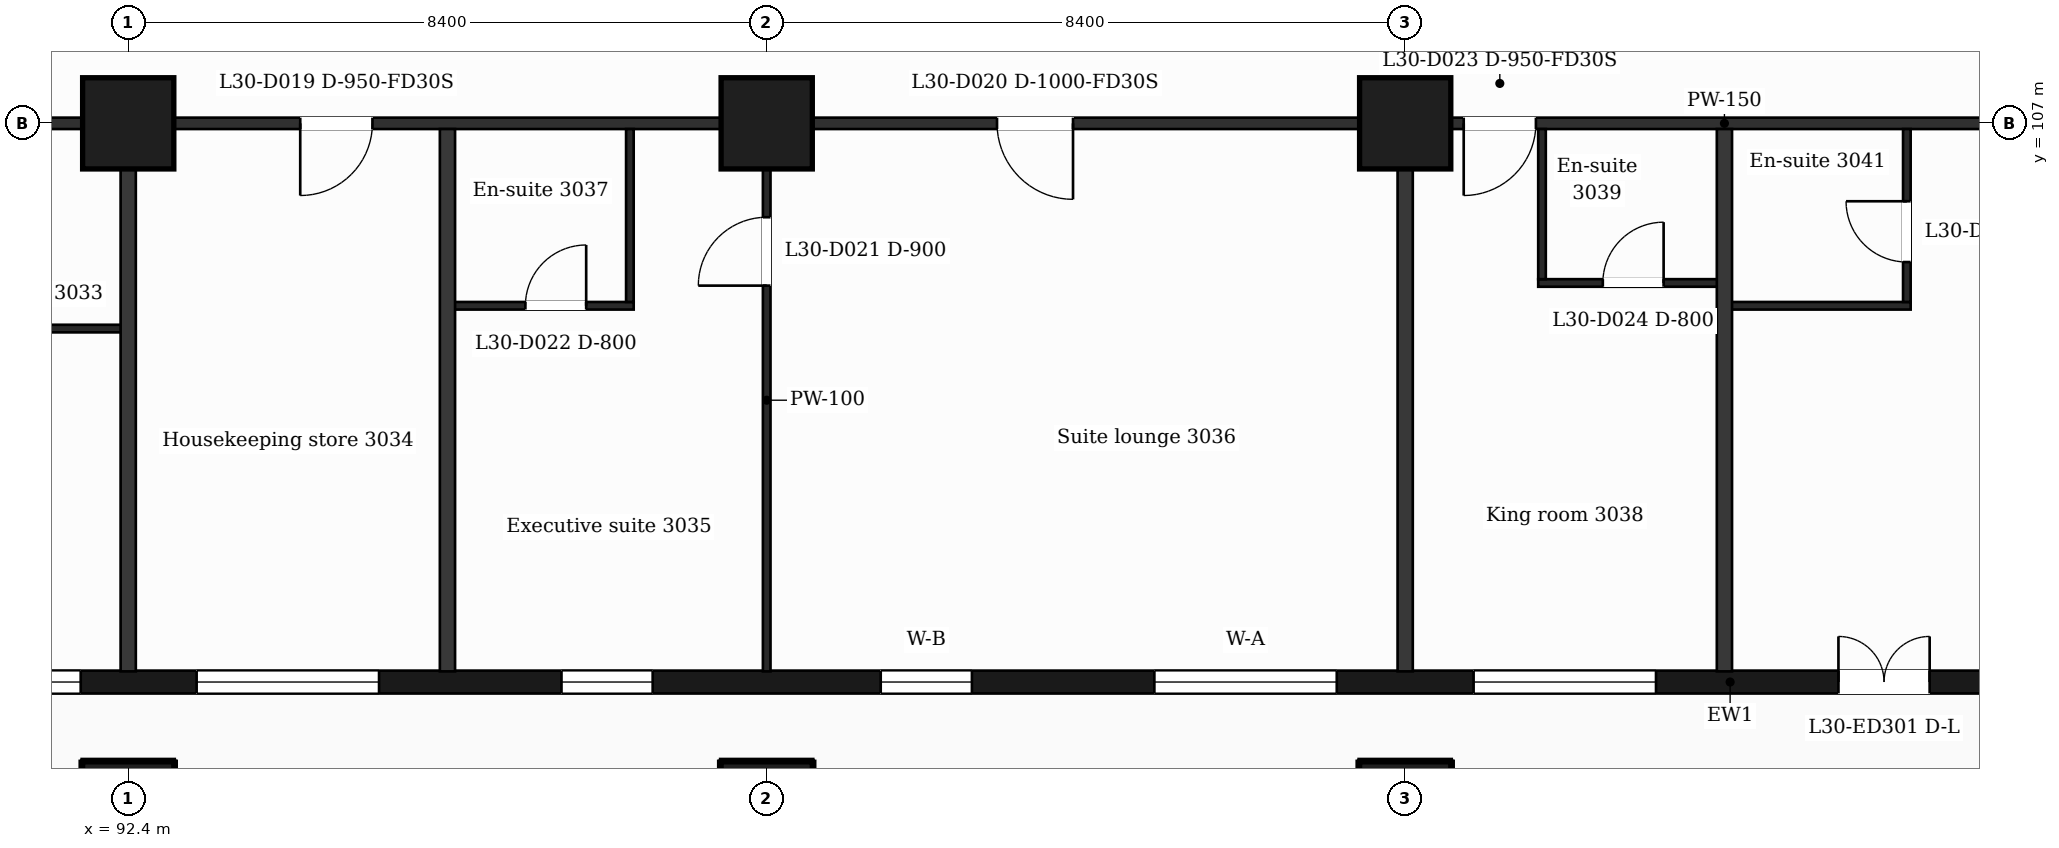
"""IFC4 building model, lengths in metres.
Left out: names, types, materials, properties, quantities, classifications, styles, units other than length and angle.
Written with IfcOpenShell. Run it as: python <this file> out.ifc"""

import sys

from ifc_helpers import new_model, si_unit, direction, frame, frame_2d, origin, origin_2d, place, context, subcontext, project, spatial, rectangle, extrude, element, fill, save


model = new_model("IFC4")
c1 = context("Model", 3, precision=1e-05, world=origin(), true_north=direction((0.0, 1.0)))
c2 = subcontext(c1, "Body", "Model", "MODEL_VIEW")
j1 = project(units=[si_unit("LENGTHUNIT", "METRE"), si_unit("PLANEANGLEUNIT", "RADIAN")], contexts=[c1])
p1 = place(None, origin())
s1 = spatial("IfcSite", under=j1, at=p1, CompositionType="ELEMENT")
p2 = place(p1, origin())
s2 = spatial("IfcBuilding", under=s1, at=p2, CompositionType="ELEMENT")
p3 = place(p2, frame((0.0, 0.0, 128.0)))
s3 = spatial("IfcBuildingStorey", under=s2, at=p3, CompositionType="ELEMENT", Elevation=128.0)
for number, where, z_axis, x_axis in (
    (1, (92.4, 98.0, 0.0), (0.0, 0.0, 1.0), (1.0, 0.0, 0.0)),
    (2, (100.8, 98.0, 0.0), (0.0, 0.0, 1.0), (1.0, 0.0, 0.0)),
    (3, (109.2, 98.0, 0.0), (0.0, 0.0, 1.0), (1.0, 0.0, 0.0)),
    (4, (92.4, 107.0, 0.0), (0.0, 0.0, 1.0), (1.0, 0.0, 0.0)),
    (5, (100.8, 107.0, 0.0), (0.0, 0.0, 1.0), (1.0, 0.0, 0.0)),
    (6, (109.2, 107.0, 0.0), (0.0, 0.0, 1.0), (1.0, 0.0, 0.0)),
):
    element("IfcColumn", number, at=place(p3, frame(where, z_axis=z_axis, x_axis=x_axis)), inside=s3, PredefinedType="COLUMN", context=c2, shape_type="SweptSolid", body=[
        extrude(rectangle(XDim=1.2, YDim=1.2, at=origin_2d()), origin(), (0.0, 0.0, 1.0), 3.7),
    ])
p4 = place(p3, frame((89.85, 99.65, 0.0), z_axis=(0.0, 0.0, 1.0), x_axis=(1.0, 0.0, 0.0)))
e7 = element("IfcWall", 7, at=p4, inside=s3, PredefinedType="SOLIDWALL", context=c2, shape_type="SweptSolid", body=[
    extrude(rectangle(XDim=47.25, YDim=0.3, at=frame_2d((23.625, 0.0))), origin(), (0.0, 0.0, 1.0), 3.38),
])
p5 = place(p4, frame((0.725, 0.0, 0.9)))
e8 = element("IfcOpeningElement", 8, at=p5, cuts=e7, PredefinedType="OPENING", context=c2, shape_type="SweptSolid", body=[
    extrude(rectangle(XDim=1.2, YDim=2.1, at=frame_2d((0.6, 1.05))), frame((0.0, 0.16, 0.0), z_axis=(0.0, -1.0, 0.0), x_axis=(1.0, 0.0, 0.0)), (0.0, 0.0, 1.0), 0.32),
])
p6 = place(p4, frame((3.45, 0.0, 0.9)))
e9 = element("IfcOpeningElement", 9, at=p6, cuts=e7, PredefinedType="OPENING", context=c2, shape_type="SweptSolid", body=[
    extrude(rectangle(XDim=2.4, YDim=2.1, at=frame_2d((1.2, 1.05))), frame((0.0, 0.16, 0.0), z_axis=(0.0, -1.0, 0.0), x_axis=(1.0, 0.0, 0.0)), (0.0, 0.0, 1.0), 0.32),
])
p7 = place(p4, frame((8.25, 0.0, 0.9)))
e10 = element("IfcOpeningElement", 10, at=p7, cuts=e7, PredefinedType="OPENING", context=c2, shape_type="SweptSolid", body=[
    extrude(rectangle(XDim=1.2, YDim=2.1, at=frame_2d((0.6, 1.05))), frame((0.0, 0.16, 0.0), z_axis=(0.0, -1.0, 0.0), x_axis=(1.0, 0.0, 0.0)), (0.0, 0.0, 1.0), 0.32),
])
p8 = place(p4, frame((12.45, 0.0, 0.9)))
e11 = element("IfcOpeningElement", 11, at=p8, cuts=e7, PredefinedType="OPENING", context=c2, shape_type="SweptSolid", body=[
    extrude(rectangle(XDim=1.2, YDim=2.1, at=frame_2d((0.6, 1.05))), frame((0.0, 0.16, 0.0), z_axis=(0.0, -1.0, 0.0), x_axis=(1.0, 0.0, 0.0)), (0.0, 0.0, 1.0), 0.32),
])
p9 = place(p4, frame((16.05, 0.0, 0.9)))
e12 = element("IfcOpeningElement", 12, at=p9, cuts=e7, PredefinedType="OPENING", context=c2, shape_type="SweptSolid", body=[
    extrude(rectangle(XDim=2.4, YDim=2.1, at=frame_2d((1.2, 1.05))), frame((0.0, 0.16, 0.0), z_axis=(0.0, -1.0, 0.0), x_axis=(1.0, 0.0, 0.0)), (0.0, 0.0, 1.0), 0.32),
])
p10 = place(p4, frame((20.25, 0.0, 0.9)))
e13 = element("IfcOpeningElement", 13, at=p10, cuts=e7, PredefinedType="OPENING", context=c2, shape_type="SweptSolid", body=[
    extrude(rectangle(XDim=2.4, YDim=2.1, at=frame_2d((1.2, 1.05))), frame((0.0, 0.16, 0.0), z_axis=(0.0, -1.0, 0.0), x_axis=(1.0, 0.0, 0.0)), (0.0, 0.0, 1.0), 0.32),
])
p11 = place(p4, frame((25.05, 0.0, 0.0)))
e14 = element("IfcOpeningElement", 14, at=p11, cuts=e7, PredefinedType="OPENING", context=c2, shape_type="SweptSolid", body=[
    extrude(rectangle(XDim=1.2, YDim=2.4, at=frame_2d((0.6, 1.2))), frame((0.0, 0.16, 0.0), z_axis=(0.0, -1.0, 0.0), x_axis=(1.0, 0.0, 0.0)), (0.0, 0.0, 1.0), 0.32),
])
p12 = place(p4, frame((28.65, 0.0, 0.9)))
e15 = element("IfcOpeningElement", 15, at=p12, cuts=e7, PredefinedType="OPENING", context=c2, shape_type="SweptSolid", body=[
    extrude(rectangle(XDim=2.4, YDim=2.1, at=frame_2d((1.2, 1.05))), frame((0.0, 0.16, 0.0), z_axis=(0.0, -1.0, 0.0), x_axis=(1.0, 0.0, 0.0)), (0.0, 0.0, 1.0), 0.32),
])
p13 = place(p4, frame((32.85, 0.0, 0.9)))
e16 = element("IfcOpeningElement", 16, at=p13, cuts=e7, PredefinedType="OPENING", context=c2, shape_type="SweptSolid", body=[
    extrude(rectangle(XDim=2.4, YDim=2.1, at=frame_2d((1.2, 1.05))), frame((0.0, 0.16, 0.0), z_axis=(0.0, -1.0, 0.0), x_axis=(1.0, 0.0, 0.0)), (0.0, 0.0, 1.0), 0.32),
])
p14 = place(p4, frame((37.65, 0.0, 0.9)))
e17 = element("IfcOpeningElement", 17, at=p14, cuts=e7, PredefinedType="OPENING", context=c2, shape_type="SweptSolid", body=[
    extrude(rectangle(XDim=1.2, YDim=2.1, at=frame_2d((0.6, 1.05))), frame((0.0, 0.16, 0.0), z_axis=(0.0, -1.0, 0.0), x_axis=(1.0, 0.0, 0.0)), (0.0, 0.0, 1.0), 0.32),
])
p15 = place(p4, frame((41.85, 0.0, 0.9)))
e18 = element("IfcOpeningElement", 18, at=p15, cuts=e7, PredefinedType="OPENING", context=c2, shape_type="SweptSolid", body=[
    extrude(rectangle(XDim=1.2, YDim=2.1, at=frame_2d((0.6, 1.05))), frame((0.0, 0.16, 0.0), z_axis=(0.0, -1.0, 0.0), x_axis=(1.0, 0.0, 0.0)), (0.0, 0.0, 1.0), 0.32),
])
p16 = place(p4, frame((45.25, 0.0, 0.9)))
e19 = element("IfcOpeningElement", 19, at=p16, cuts=e7, PredefinedType="OPENING", context=c2, shape_type="SweptSolid", body=[
    extrude(rectangle(XDim=1.2, YDim=2.1, at=frame_2d((0.6, 1.05))), frame((0.0, 0.16, 0.0), z_axis=(0.0, -1.0, 0.0), x_axis=(1.0, 0.0, 0.0)), (0.0, 0.0, 1.0), 0.32),
])
p17 = place(p3, frame((89.95, 104.3, 0.0), z_axis=(0.0, 0.0, 1.0), x_axis=(1.0, 0.0, 0.0)))
e20 = element("IfcWall", 20, at=p17, inside=s3, PredefinedType="PARTITIONING", context=c2, shape_type="SweptSolid", body=[
    extrude(rectangle(XDim=2.45, YDim=0.1, at=frame_2d((1.225, 0.0))), origin(), (0.0, 0.0, 1.0), 3.38),
])
p18 = place(p3, frame((96.6, 104.6, 0.0), z_axis=(0.0, 0.0, 1.0), x_axis=(1.0, 0.0, 0.0)))
e21 = element("IfcWall", 21, at=p18, inside=s3, PredefinedType="PARTITIONING", context=c2, shape_type="SweptSolid", body=[
    extrude(rectangle(XDim=2.45, YDim=0.1, at=frame_2d((1.225, 0.0))), origin(), (0.0, 0.0, 1.0), 3.38),
])
p19 = place(p18, frame((1.025, 0.0, 0.0)))
e22 = element("IfcOpeningElement", 22, at=p19, cuts=e21, PredefinedType="OPENING", context=c2, shape_type="SweptSolid", body=[
    extrude(rectangle(XDim=0.8, YDim=2.1, at=frame_2d((0.4, 1.05))), frame((0.0, 0.06, 0.0), z_axis=(0.0, -1.0, 0.0), x_axis=(1.0, 0.0, 0.0)), (0.0, 0.0, 1.0), 0.12),
])
p20 = place(p3, frame((113.4, 104.6, 0.0), z_axis=(0.0, 0.0, 1.0), x_axis=(1.0, 0.0, 0.0)))
e23 = element("IfcWall", 23, at=p20, inside=s3, PredefinedType="PARTITIONING", context=c2, shape_type="SweptSolid", body=[
    extrude(rectangle(XDim=2.45, YDim=0.1, at=frame_2d((1.225, 0.0))), origin(), (0.0, 0.0, 1.0), 3.38),
])
p21 = place(p3, frame((110.95, 104.9, 0.0), z_axis=(0.0, 0.0, 1.0), x_axis=(1.0, 0.0, 0.0)))
e24 = element("IfcWall", 24, at=p21, inside=s3, PredefinedType="PARTITIONING", context=c2, shape_type="SweptSolid", body=[
    extrude(rectangle(XDim=2.45, YDim=0.1, at=frame_2d((1.225, 0.0))), origin(), (0.0, 0.0, 1.0), 3.38),
])
p22 = place(p21, frame((0.85, 0.0, 0.0)))
e25 = element("IfcOpeningElement", 25, at=p22, cuts=e24, PredefinedType="OPENING", context=c2, shape_type="SweptSolid", body=[
    extrude(rectangle(XDim=0.8, YDim=2.1, at=frame_2d((0.4, 1.05))), frame((0.0, 0.06, 0.0), z_axis=(0.0, -1.0, 0.0), x_axis=(1.0, 0.0, 0.0)), (0.0, 0.0, 1.0), 0.12),
])
p23 = place(p3, frame((87.018, 107.0, 0.0), z_axis=(0.0, 0.0, 1.0), x_axis=(1.0, 0.0, 0.0)))
e26 = element("IfcWall", 26, at=p23, inside=s3, PredefinedType="PARTITIONING", context=c2, shape_type="SweptSolid", body=[
    extrude(rectangle(XDim=52.765, YDim=0.15, at=frame_2d((26.382, 0.0))), origin(), (0.0, 0.0, 1.0), 3.38),
])
p24 = place(p23, frame((1.276, 0.0, 0.0)))
e27 = element("IfcOpeningElement", 27, at=p24, cuts=e26, PredefinedType="OPENING", context=c2, shape_type="SweptSolid", body=[
    extrude(rectangle(XDim=0.95, YDim=2.1, at=frame_2d((0.475, 1.05))), frame((0.0, 0.085, 0.0), z_axis=(0.0, -1.0, 0.0), x_axis=(1.0, 0.0, 0.0)), (0.0, 0.0, 1.0), 0.17),
])
p25 = place(p23, frame((7.645, 0.0, 0.0)))
e28 = element("IfcOpeningElement", 28, at=p25, cuts=e26, PredefinedType="OPENING", context=c2, shape_type="SweptSolid", body=[
    extrude(rectangle(XDim=0.95, YDim=2.1, at=frame_2d((0.475, 1.05))), frame((0.0, 0.085, 0.0), z_axis=(0.0, -1.0, 0.0), x_axis=(1.0, 0.0, 0.0)), (0.0, 0.0, 1.0), 0.17),
])
p26 = place(p23, frame((16.812, 0.0, 0.0)))
e29 = element("IfcOpeningElement", 29, at=p26, cuts=e26, PredefinedType="OPENING", context=c2, shape_type="SweptSolid", body=[
    extrude(rectangle(XDim=1.0, YDim=2.1, at=frame_2d((0.5, 1.05))), frame((0.0, 0.085, 0.0), z_axis=(0.0, -1.0, 0.0), x_axis=(1.0, 0.0, 0.0)), (0.0, 0.0, 1.0), 0.17),
])
p27 = place(p23, frame((22.952, 0.0, 0.0)))
e30 = element("IfcOpeningElement", 30, at=p27, cuts=e26, PredefinedType="OPENING", context=c2, shape_type="SweptSolid", body=[
    extrude(rectangle(XDim=0.95, YDim=2.1, at=frame_2d((0.475, 1.05))), frame((0.0, 0.085, 0.0), z_axis=(0.0, -1.0, 0.0), x_axis=(1.0, 0.0, 0.0)), (0.0, 0.0, 1.0), 0.17),
])
p28 = place(p23, frame((31.742, 0.0, 0.0)))
e31 = element("IfcOpeningElement", 31, at=p28, cuts=e26, PredefinedType="OPENING", context=c2, shape_type="SweptSolid", body=[
    extrude(rectangle(XDim=0.95, YDim=2.1, at=frame_2d((0.475, 1.05))), frame((0.0, 0.085, 0.0), z_axis=(0.0, -1.0, 0.0), x_axis=(1.0, 0.0, 0.0)), (0.0, 0.0, 1.0), 0.17),
])
p29 = place(p23, frame((35.169, 0.0, 0.0)))
e32 = element("IfcOpeningElement", 32, at=p29, cuts=e26, PredefinedType="OPENING", context=c2, shape_type="SweptSolid", body=[
    extrude(rectangle(XDim=0.95, YDim=2.1, at=frame_2d((0.475, 1.05))), frame((0.0, 0.085, 0.0), z_axis=(0.0, -1.0, 0.0), x_axis=(1.0, 0.0, 0.0)), (0.0, 0.0, 1.0), 0.17),
])
p30 = place(p23, frame((41.807, 0.0, 0.0)))
e33 = element("IfcOpeningElement", 33, at=p30, cuts=e26, PredefinedType="OPENING", context=c2, shape_type="SweptSolid", body=[
    extrude(rectangle(XDim=0.95, YDim=2.1, at=frame_2d((0.475, 1.05))), frame((0.0, 0.085, 0.0), z_axis=(0.0, -1.0, 0.0), x_axis=(1.0, 0.0, 0.0)), (0.0, 0.0, 1.0), 0.17),
])
p31 = place(p23, frame((43.832, 0.0, 0.0)))
e34 = element("IfcOpeningElement", 34, at=p31, cuts=e26, PredefinedType="OPENING", context=c2, shape_type="SweptSolid", body=[
    extrude(rectangle(XDim=0.95, YDim=2.1, at=frame_2d((0.475, 1.05))), frame((0.0, 0.085, 0.0), z_axis=(0.0, -1.0, 0.0), x_axis=(1.0, 0.0, 0.0)), (0.0, 0.0, 1.0), 0.17),
])
p32 = place(p23, frame((48.974, 0.0, 0.0)))
e35 = element("IfcOpeningElement", 35, at=p32, cuts=e26, PredefinedType="OPENING", context=c2, shape_type="SweptSolid", body=[
    extrude(rectangle(XDim=0.95, YDim=2.1, at=frame_2d((0.475, 1.05))), frame((0.0, 0.085, 0.0), z_axis=(0.0, -1.0, 0.0), x_axis=(1.0, 0.0, 0.0)), (0.0, 0.0, 1.0), 0.17),
])
for number, where, z_axis, x_axis in (
    (36, (92.4, 99.79, 0.0), (0.0, 0.0, 1.0), (0.0, 1.0, 0.0)),
    (37, (96.6, 99.79, 0.0), (0.0, 0.0, 1.0), (0.0, 1.0, 0.0)),
):
    element("IfcWall", number, at=place(p3, frame(where, z_axis=z_axis, x_axis=x_axis)), inside=s3, PredefinedType="PARTITIONING", context=c2, shape_type="SweptSolid", body=[
        extrude(rectangle(XDim=7.135, YDim=0.2, at=frame_2d((3.567, 0.0))), origin(), (0.0, 0.0, 1.0), 3.38),
    ])
p33 = place(p3, frame((99.0, 104.65, 0.0), z_axis=(0.0, 0.0, 1.0), x_axis=(0.0, 1.0, 0.0)))
e38 = element("IfcWall", 38, at=p33, inside=s3, PredefinedType="PARTITIONING", context=c2, shape_type="SweptSolid", body=[
    extrude(rectangle(XDim=2.275, YDim=0.1, at=frame_2d((1.138, 0.0))), origin(), (0.0, 0.0, 1.0), 3.38),
])
p34 = place(p3, frame((100.8, 99.79, 0.0), z_axis=(0.0, 0.0, 1.0), x_axis=(0.0, 1.0, 0.0)))
e39 = element("IfcWall", 39, at=p34, inside=s3, PredefinedType="PARTITIONING", context=c2, shape_type="SweptSolid", body=[
    extrude(rectangle(XDim=7.135, YDim=0.1, at=frame_2d((3.567, 0.0))), origin(), (0.0, 0.0, 1.0), 3.38),
])
p35 = place(p34, frame((5.075, 0.0, 0.0)))
e40 = element("IfcOpeningElement", 40, at=p35, cuts=e39, PredefinedType="OPENING", context=c2, shape_type="SweptSolid", body=[
    extrude(rectangle(XDim=0.9, YDim=2.1, at=frame_2d((0.45, 1.05))), frame((0.0, 0.06, 0.0), z_axis=(0.0, -1.0, 0.0), x_axis=(1.0, 0.0, 0.0)), (0.0, 0.0, 1.0), 0.12),
])
p36 = place(p3, frame((109.2, 99.79, 0.0), z_axis=(0.0, 0.0, 1.0), x_axis=(0.0, 1.0, 0.0)))
e41 = element("IfcWall", 41, at=p36, inside=s3, PredefinedType="PARTITIONING", context=c2, shape_type="SweptSolid", body=[
    extrude(rectangle(XDim=7.135, YDim=0.2, at=frame_2d((3.567, 0.0))), origin(), (0.0, 0.0, 1.0), 3.38),
])
p37 = place(p3, frame((111.0, 104.95, 0.0), z_axis=(0.0, 0.0, 1.0), x_axis=(0.0, 1.0, 0.0)))
e42 = element("IfcWall", 42, at=p37, inside=s3, PredefinedType="PARTITIONING", context=c2, shape_type="SweptSolid", body=[
    extrude(rectangle(XDim=1.975, YDim=0.1, at=frame_2d((0.988, 0.0))), origin(), (0.0, 0.0, 1.0), 3.38),
])
p38 = place(p3, frame((113.4, 99.79, 0.0), z_axis=(0.0, 0.0, 1.0), x_axis=(0.0, 1.0, 0.0)))
e43 = element("IfcWall", 43, at=p38, inside=s3, PredefinedType="PARTITIONING", context=c2, shape_type="SweptSolid", body=[
    extrude(rectangle(XDim=7.135, YDim=0.2, at=frame_2d((3.567, 0.0))), origin(), (0.0, 0.0, 1.0), 3.38),
])
p39 = place(p3, frame((115.8, 104.65, 0.0), z_axis=(0.0, 0.0, 1.0), x_axis=(0.0, 1.0, 0.0)))
e44 = element("IfcWall", 44, at=p39, inside=s3, PredefinedType="PARTITIONING", context=c2, shape_type="SweptSolid", body=[
    extrude(rectangle(XDim=2.275, YDim=0.1, at=frame_2d((1.138, 0.0))), origin(), (0.0, 0.0, 1.0), 3.38),
])
p40 = place(p39, frame((0.525, 0.0, 0.0)))
e45 = element("IfcOpeningElement", 45, at=p40, cuts=e44, PredefinedType="OPENING", context=c2, shape_type="SweptSolid", body=[
    extrude(rectangle(XDim=0.8, YDim=2.1, at=frame_2d((0.4, 1.05))), frame((0.0, 0.06, 0.0), z_axis=(0.0, -1.0, 0.0), x_axis=(1.0, 0.0, 0.0)), (0.0, 0.0, 1.0), 0.12),
])
p41 = place(p5, origin())
e46 = element("IfcWindow", 46, at=p41, inside=s3, PartitioningType="SINGLE_PANEL", PredefinedType="WINDOW", context=c2, shape_type="SweptSolid", body=[
    extrude(rectangle(XDim=1.2, YDim=2.1, at=frame_2d((0.6, 1.05))), frame((0.0, 0.03, 0.0), z_axis=(0.0, -1.0, 0.0), x_axis=(1.0, 0.0, 0.0)), (0.0, 0.0, 1.0), 0.06),
])
fill(e8, e46)
p42 = place(p6, origin())
e47 = element("IfcWindow", 47, at=p42, inside=s3, PartitioningType="SINGLE_PANEL", PredefinedType="WINDOW", context=c2, shape_type="SweptSolid", body=[
    extrude(rectangle(XDim=2.4, YDim=2.1, at=frame_2d((1.2, 1.05))), frame((0.0, 0.03, 0.0), z_axis=(0.0, -1.0, 0.0), x_axis=(1.0, 0.0, 0.0)), (0.0, 0.0, 1.0), 0.06),
])
fill(e9, e47)
p43 = place(p7, origin())
e48 = element("IfcWindow", 48, at=p43, inside=s3, PartitioningType="SINGLE_PANEL", PredefinedType="WINDOW", context=c2, shape_type="SweptSolid", body=[
    extrude(rectangle(XDim=1.2, YDim=2.1, at=frame_2d((0.6, 1.05))), frame((0.0, 0.03, 0.0), z_axis=(0.0, -1.0, 0.0), x_axis=(1.0, 0.0, 0.0)), (0.0, 0.0, 1.0), 0.06),
])
fill(e10, e48)
p44 = place(p8, origin())
e49 = element("IfcWindow", 49, at=p44, inside=s3, PartitioningType="SINGLE_PANEL", PredefinedType="WINDOW", context=c2, shape_type="SweptSolid", body=[
    extrude(rectangle(XDim=1.2, YDim=2.1, at=frame_2d((0.6, 1.05))), frame((0.0, 0.03, 0.0), z_axis=(0.0, -1.0, 0.0), x_axis=(1.0, 0.0, 0.0)), (0.0, 0.0, 1.0), 0.06),
])
fill(e11, e49)
p45 = place(p9, origin())
e50 = element("IfcWindow", 50, at=p45, inside=s3, PartitioningType="SINGLE_PANEL", PredefinedType="WINDOW", context=c2, shape_type="SweptSolid", body=[
    extrude(rectangle(XDim=2.4, YDim=2.1, at=frame_2d((1.2, 1.05))), frame((0.0, 0.03, 0.0), z_axis=(0.0, -1.0, 0.0), x_axis=(1.0, 0.0, 0.0)), (0.0, 0.0, 1.0), 0.06),
])
fill(e12, e50)
p46 = place(p10, origin())
e51 = element("IfcWindow", 51, at=p46, inside=s3, PartitioningType="SINGLE_PANEL", PredefinedType="WINDOW", context=c2, shape_type="SweptSolid", body=[
    extrude(rectangle(XDim=2.4, YDim=2.1, at=frame_2d((1.2, 1.05))), frame((0.0, 0.03, 0.0), z_axis=(0.0, -1.0, 0.0), x_axis=(1.0, 0.0, 0.0)), (0.0, 0.0, 1.0), 0.06),
])
fill(e13, e51)
p47 = place(p11, origin())
e52 = element("IfcDoor", 52, at=p47, inside=s3, OperationType="DOUBLE_DOOR_SINGLE_SWING", PredefinedType="DOOR", context=c2, shape_type="SweptSolid", body=[
    extrude(rectangle(XDim=1.2, YDim=2.4, at=frame_2d((0.6, 1.2))), frame((0.0, 0.025, 0.0), z_axis=(0.0, -1.0, 0.0), x_axis=(1.0, 0.0, 0.0)), (0.0, 0.0, 1.0), 0.05),
])
fill(e14, e52)
p48 = place(p25, origin())
e53 = element("IfcDoor", 53, at=p48, inside=s3, OperationType="SINGLE_SWING_LEFT", PredefinedType="DOOR", context=c2, shape_type="SweptSolid", body=[
    extrude(rectangle(XDim=0.95, YDim=2.1, at=frame_2d((0.475, 1.05))), frame((0.0, 0.025, 0.0), z_axis=(0.0, -1.0, 0.0), x_axis=(1.0, 0.0, 0.0)), (0.0, 0.0, 1.0), 0.05),
])
fill(e28, e53)
p49 = place(p26, origin())
e54 = element("IfcDoor", 54, at=p49, inside=s3, OperationType="SINGLE_SWING_RIGHT", PredefinedType="DOOR", context=c2, shape_type="SweptSolid", body=[
    extrude(rectangle(XDim=1.0, YDim=2.1, at=frame_2d((0.5, 1.05))), frame((0.0, 0.025, 0.0), z_axis=(0.0, -1.0, 0.0), x_axis=(1.0, 0.0, 0.0)), (0.0, 0.0, 1.0), 0.05),
])
fill(e29, e54)
p50 = place(p35, origin())
e55 = element("IfcDoor", 55, at=p50, inside=s3, OperationType="SINGLE_SWING_LEFT", PredefinedType="DOOR", context=c2, shape_type="SweptSolid", body=[
    extrude(rectangle(XDim=0.9, YDim=2.1, at=frame_2d((0.45, 1.05))), frame((0.0, 0.025, 0.0), z_axis=(0.0, -1.0, 0.0), x_axis=(1.0, 0.0, 0.0)), (0.0, 0.0, 1.0), 0.05),
])
fill(e40, e55)
p51 = place(p19, origin())
e56 = element("IfcDoor", 56, at=p51, inside=s3, OperationType="SINGLE_SWING_RIGHT", PredefinedType="DOOR", context=c2, shape_type="SweptSolid", body=[
    extrude(rectangle(XDim=0.8, YDim=2.1, at=frame_2d((0.4, 1.05))), frame((0.0, 0.025, 0.0), z_axis=(0.0, -1.0, 0.0), x_axis=(1.0, 0.0, 0.0)), (0.0, 0.0, 1.0), 0.05),
])
fill(e22, e56)
p52 = place(p27, origin())
e57 = element("IfcDoor", 57, at=p52, inside=s3, OperationType="SINGLE_SWING_LEFT", PredefinedType="DOOR", context=c2, shape_type="SweptSolid", body=[
    extrude(rectangle(XDim=0.95, YDim=2.1, at=frame_2d((0.475, 1.05))), frame((0.0, 0.025, 0.0), z_axis=(0.0, -1.0, 0.0), x_axis=(1.0, 0.0, 0.0)), (0.0, 0.0, 1.0), 0.05),
])
fill(e30, e57)
p53 = place(p22, origin())
e58 = element("IfcDoor", 58, at=p53, inside=s3, OperationType="SINGLE_SWING_RIGHT", PredefinedType="DOOR", context=c2, shape_type="SweptSolid", body=[
    extrude(rectangle(XDim=0.8, YDim=2.1, at=frame_2d((0.4, 1.05))), frame((0.0, 0.025, 0.0), z_axis=(0.0, -1.0, 0.0), x_axis=(1.0, 0.0, 0.0)), (0.0, 0.0, 1.0), 0.05),
])
fill(e25, e58)
p54 = place(p40, origin())
e59 = element("IfcDoor", 59, at=p54, inside=s3, OperationType="SINGLE_SWING_RIGHT", PredefinedType="DOOR", context=c2, shape_type="SweptSolid", body=[
    extrude(rectangle(XDim=0.8, YDim=2.1, at=frame_2d((0.4, 1.05))), frame((0.0, 0.025, 0.0), z_axis=(0.0, -1.0, 0.0), x_axis=(1.0, 0.0, 0.0)), (0.0, 0.0, 1.0), 0.05),
])
fill(e45, e59)
save(model, sys.argv[1])
